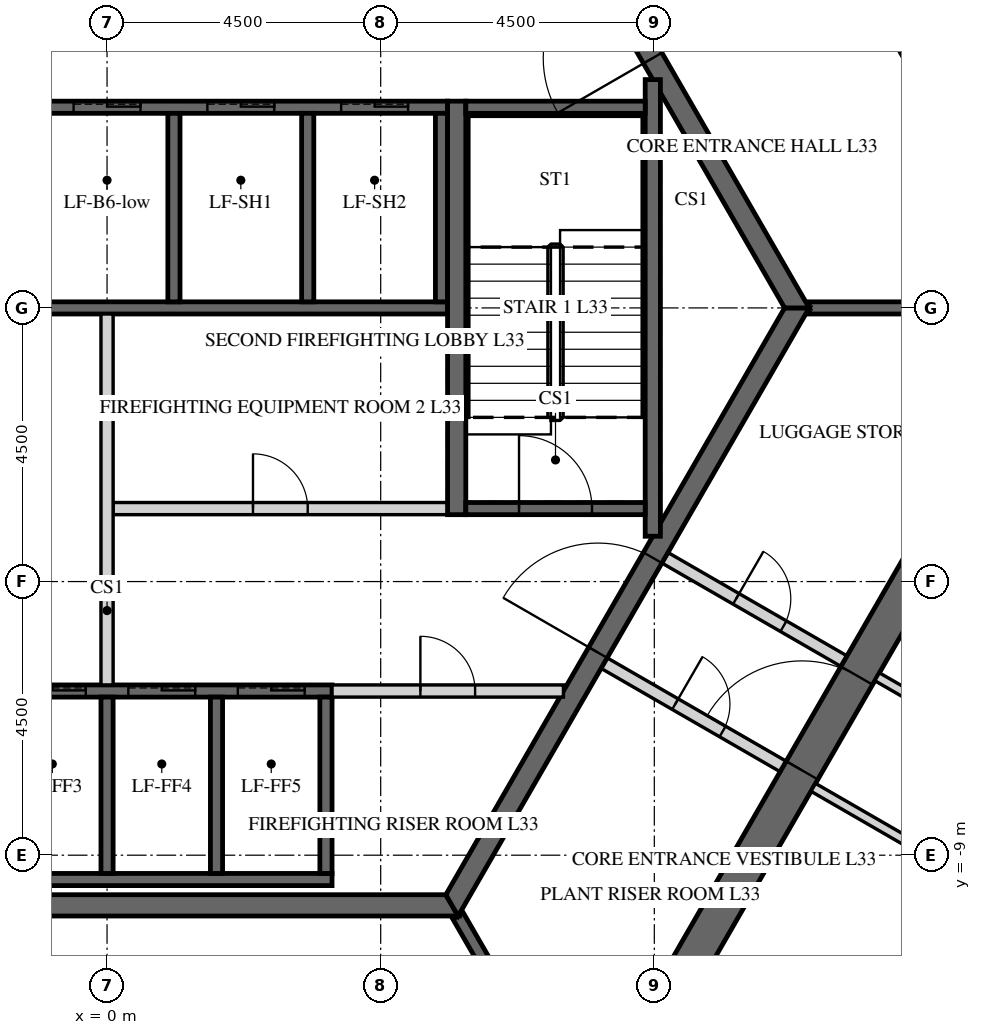
"""IFC4 building model, lengths in metres.
Left out: names, types, materials, properties, quantities, classifications, styles, units other than length and angle.
Written with IfcOpenShell. Run it as: python <this file> out.ifc"""

import sys

from ifc_helpers import new_model, si_unit, direction, frame, frame_2d, origin, place, context, subcontext, project, spatial, polyline, rectangle, outline, extrude, element, fill, save


model = new_model("IFC4")
c1 = context("Model", 3, precision=1e-05, world=origin(), true_north=direction((0.0, 1.0)))
c2 = subcontext(c1, "Body", "Model", "MODEL_VIEW")
j1 = project(units=[si_unit("LENGTHUNIT", "METRE"), si_unit("PLANEANGLEUNIT", "RADIAN")], contexts=[c1])
p1 = place(None, origin())
s1 = spatial("IfcSite", under=j1, at=p1, CompositionType="ELEMENT")
p2 = place(p1, origin())
s2 = spatial("IfcBuilding", under=s1, at=p2, CompositionType="ELEMENT")
p3 = place(p2, frame((0.0, 0.0, 142.8)))
s3 = spatial("IfcBuildingStorey", under=s2, at=p3, CompositionType="ELEMENT", Elevation=142.8)
p4 = place(p3, frame((7.91, -13.7, -0.15), z_axis=(0.0, 0.0, 1.0), x_axis=(0.499999880136, 0.866025472988, 0.0)))
e1 = element("IfcWall", 1, at=p4, inside=s3, PredefinedType="SHEAR", context=c2, shape_type="SweptSolid", body=[
    extrude(outline(polyline([(-0.173, -0.3), (15.993, -0.3), (15.646, 0.3), (0.173, 0.3), (-0.173, -0.3)])), origin(), (0.0, 0.0, 1.0), 3.75),
])
p5 = place(p4, frame((7.039, 0.0, 0.15)))
e2 = element("IfcOpeningElement", 2, at=p5, cuts=e1, PredefinedType="OPENING", context=c2, shape_type="SweptSolid", body=[
    extrude(rectangle(XDim=1.8, YDim=2.4, at=frame_2d((0.9, 1.2))), frame((0.0, 0.31, 0.0), z_axis=(0.0, -1.0, 0.0), x_axis=(1.0, 0.0, 0.0)), (0.0, 0.0, 1.0), 0.62),
])
p6 = place(p3, frame((15.819, 0.0, -0.15), z_axis=(0.0, 0.0, 1.0), x_axis=(-0.499999880136, 0.866025472988, 0.0)))
e3 = element("IfcWall", 3, at=p6, inside=s3, PredefinedType="SHEAR", context=c2, shape_type="SweptSolid", body=[
    extrude(outline(polyline([(-0.173, -0.3), (15.993, -0.3), (15.646, 0.3), (0.173, 0.3), (-0.173, -0.3)])), origin(), (0.0, 0.0, 1.0), 3.75),
])
p7 = place(p6, frame((6.981, 0.0, 0.15)))
e4 = element("IfcOpeningElement", 4, at=p7, cuts=e3, PredefinedType="OPENING", context=c2, shape_type="SweptSolid", body=[
    extrude(rectangle(XDim=1.8, YDim=2.4, at=frame_2d((0.9, 1.2))), frame((0.0, 0.31, 0.0), z_axis=(0.0, -1.0, 0.0), x_axis=(1.0, 0.0, 0.0)), (0.0, 0.0, 1.0), 0.62),
])
p8 = place(p3, frame((-5.673, -9.825, -0.15), z_axis=(0.0, 0.0, 1.0), x_axis=(1.0, 0.0, 0.0)))
e5 = element("IfcWall", 5, at=p8, inside=s3, PredefinedType="SHEAR", context=c2, shape_type="SweptSolid", body=[
    extrude(outline(polyline([(-0.101, -0.175), (11.446, -0.175), (11.244, 0.175), (0.101, 0.175), (-0.101, -0.175)])), origin(), (0.0, 0.0, 1.0), 3.75),
])
p9 = place(p3, frame((5.673, -9.825, -0.15), z_axis=(0.0, 0.0, 1.0), x_axis=(0.499995046907, 0.866028263435, 0.0)))
e6 = element("IfcWall", 6, at=p9, inside=s3, PredefinedType="SHEAR", context=c2, shape_type="SweptSolid", body=[
    extrude(outline(polyline([(-0.101, -0.175), (11.446, -0.175), (11.244, 0.175), (0.101, 0.175), (-0.101, -0.175)])), origin(), (0.0, 0.0, 1.0), 3.75),
])
p10 = place(p9, frame((4.801, 0.0, 0.15)))
e7 = element("IfcOpeningElement", 7, at=p10, cuts=e6, PredefinedType="OPENING", context=c2, shape_type="SweptSolid", body=[
    extrude(rectangle(XDim=1.8, YDim=2.4, at=frame_2d((0.9, 1.2))), frame((0.0, 0.185, 0.0), z_axis=(0.0, -1.0, 0.0), x_axis=(1.0, 0.0, 0.0)), (0.0, 0.0, 1.0), 0.37),
])
p11 = place(p3, frame((11.345, 0.0, -0.15), z_axis=(0.0, 0.0, 1.0), x_axis=(-0.499995046907, 0.866028263435, 0.0)))
e8 = element("IfcWall", 8, at=p11, inside=s3, PredefinedType="SHEAR", context=c2, shape_type="SweptSolid", body=[
    extrude(outline(polyline([(-0.101, -0.175), (11.446, -0.175), (11.244, 0.175), (0.101, 0.175), (-0.101, -0.175)])), origin(), (0.0, 0.0, 1.0), 3.75),
])
p12 = place(p11, frame((4.744, 0.0, 0.15)))
e9 = element("IfcOpeningElement", 9, at=p12, cuts=e8, PredefinedType="OPENING", context=c2, shape_type="SweptSolid", body=[
    extrude(rectangle(XDim=1.8, YDim=2.4, at=frame_2d((0.9, 1.2))), frame((0.0, 0.185, 0.0), z_axis=(0.0, -1.0, 0.0), x_axis=(1.0, 0.0, 0.0)), (0.0, 0.0, 1.0), 0.37),
])
p13 = place(p3, frame((-5.6, 3.3, -0.25), z_axis=(0.0, 0.0, 1.0), x_axis=(1.0, 0.0, 0.0)))
e10 = element("IfcWall", 10, at=p13, inside=s3, PredefinedType="SHEAR", context=c2, shape_type="SweptSolid", body=[
    extrude(rectangle(XDim=11.2, YDim=0.2, at=frame_2d((5.6, 0.0))), origin(), (0.0, 0.0, 1.0), 3.9),
])
p14 = place(p13, frame((0.65, 0.0, 0.25)))
e11 = element("IfcOpeningElement", 11, at=p14, cuts=e10, PredefinedType="OPENING", context=c2, shape_type="SweptSolid", body=[
    extrude(rectangle(XDim=1.1, YDim=2.1, at=frame_2d((0.55, 1.05))), frame((0.0, 0.11, 0.0), z_axis=(0.0, -1.0, 0.0), x_axis=(1.0, 0.0, 0.0)), (0.0, 0.0, 1.0), 0.22),
])
p15 = place(p13, frame((2.85, 0.0, 0.25)))
e12 = element("IfcOpeningElement", 12, at=p15, cuts=e10, PredefinedType="OPENING", context=c2, shape_type="SweptSolid", body=[
    extrude(rectangle(XDim=1.1, YDim=2.1, at=frame_2d((0.55, 1.05))), frame((0.0, 0.11, 0.0), z_axis=(0.0, -1.0, 0.0), x_axis=(1.0, 0.0, 0.0)), (0.0, 0.0, 1.0), 0.22),
])
p16 = place(p13, frame((5.05, 0.0, 0.25)))
e13 = element("IfcOpeningElement", 13, at=p16, cuts=e10, PredefinedType="OPENING", context=c2, shape_type="SweptSolid", body=[
    extrude(rectangle(XDim=1.1, YDim=2.1, at=frame_2d((0.55, 1.05))), frame((0.0, 0.11, 0.0), z_axis=(0.0, -1.0, 0.0), x_axis=(1.0, 0.0, 0.0)), (0.0, 0.0, 1.0), 0.22),
])
p17 = place(p13, frame((7.25, 0.0, 0.25)))
e14 = element("IfcOpeningElement", 14, at=p17, cuts=e10, PredefinedType="OPENING", context=c2, shape_type="SweptSolid", body=[
    extrude(rectangle(XDim=1.1, YDim=2.1, at=frame_2d((0.55, 1.05))), frame((0.0, 0.11, 0.0), z_axis=(0.0, -1.0, 0.0), x_axis=(1.0, 0.0, 0.0)), (0.0, 0.0, 1.0), 0.22),
])
p18 = place(p13, frame((9.45, 0.0, 0.25)))
e15 = element("IfcOpeningElement", 15, at=p18, cuts=e10, PredefinedType="OPENING", context=c2, shape_type="SweptSolid", body=[
    extrude(rectangle(XDim=1.1, YDim=2.1, at=frame_2d((0.55, 1.05))), frame((0.0, 0.11, 0.0), z_axis=(0.0, -1.0, 0.0), x_axis=(1.0, 0.0, 0.0)), (0.0, 0.0, 1.0), 0.22),
])
p19 = place(p3, frame((-5.6, 0.0, -0.25), z_axis=(0.0, 0.0, 1.0), x_axis=(1.0, 0.0, 0.0)))
e16 = element("IfcWall", 16, at=p19, inside=s3, PredefinedType="SHEAR", context=c2, shape_type="SweptSolid", body=[
    extrude(rectangle(XDim=11.2, YDim=0.2, at=frame_2d((5.6, 0.0))), origin(), (0.0, 0.0, 1.0), 3.9),
])
for number, where, z_axis, x_axis in (
    (17, (1.1, 0.1, -0.25), (0.0, 0.0, 1.0), (0.0, 1.0, 0.0)),
    (18, (3.3, 0.1, -0.25), (0.0, 0.0, 1.0), (0.0, 1.0, 0.0)),
    (19, (5.5, 0.1, -0.25), (0.0, 0.0, 1.0), (0.0, 1.0, 0.0)),
):
    element("IfcWall", number, at=place(p3, frame(where, z_axis=z_axis, x_axis=x_axis)), inside=s3, PredefinedType="SHEAR", context=c2, shape_type="SweptSolid", body=[
        extrude(rectangle(XDim=3.1, YDim=0.2, at=frame_2d((1.55, 0.0))), origin(), (0.0, 0.0, 1.0), 3.9),
    ])
p20 = place(p3, frame((-5.5, -6.3, -0.25), z_axis=(0.0, 0.0, 1.0), x_axis=(1.0, 0.0, 0.0)))
e20 = element("IfcWall", 20, at=p20, inside=s3, PredefinedType="SHEAR", context=c2, shape_type="SweptSolid", body=[
    extrude(rectangle(XDim=9.2, YDim=0.2, at=frame_2d((4.6, 0.0))), origin(), (0.0, 0.0, 1.0), 3.9),
])
p21 = place(p20, frame((0.45, 0.0, 0.25)))
e21 = element("IfcOpeningElement", 21, at=p21, cuts=e20, PredefinedType="OPENING", context=c2, shape_type="SweptSolid", body=[
    extrude(rectangle(XDim=1.1, YDim=2.1, at=frame_2d((0.55, 1.05))), frame((0.0, 0.11, 0.0), z_axis=(0.0, -1.0, 0.0), x_axis=(1.0, 0.0, 0.0)), (0.0, 0.0, 1.0), 0.22),
])
p22 = place(p20, frame((2.25, 0.0, 0.25)))
e22 = element("IfcOpeningElement", 22, at=p22, cuts=e20, PredefinedType="OPENING", context=c2, shape_type="SweptSolid", body=[
    extrude(rectangle(XDim=1.1, YDim=2.1, at=frame_2d((0.55, 1.05))), frame((0.0, 0.11, 0.0), z_axis=(0.0, -1.0, 0.0), x_axis=(1.0, 0.0, 0.0)), (0.0, 0.0, 1.0), 0.22),
])
p23 = place(p20, frame((4.05, 0.0, 0.25)))
e23 = element("IfcOpeningElement", 23, at=p23, cuts=e20, PredefinedType="OPENING", context=c2, shape_type="SweptSolid", body=[
    extrude(rectangle(XDim=1.1, YDim=2.1, at=frame_2d((0.55, 1.05))), frame((0.0, 0.11, 0.0), z_axis=(0.0, -1.0, 0.0), x_axis=(1.0, 0.0, 0.0)), (0.0, 0.0, 1.0), 0.22),
])
p24 = place(p20, frame((5.85, 0.0, 0.25)))
e24 = element("IfcOpeningElement", 24, at=p24, cuts=e20, PredefinedType="OPENING", context=c2, shape_type="SweptSolid", body=[
    extrude(rectangle(XDim=1.1, YDim=2.1, at=frame_2d((0.55, 1.05))), frame((0.0, 0.11, 0.0), z_axis=(0.0, -1.0, 0.0), x_axis=(1.0, 0.0, 0.0)), (0.0, 0.0, 1.0), 0.22),
])
p25 = place(p20, frame((7.65, 0.0, 0.25)))
e25 = element("IfcOpeningElement", 25, at=p25, cuts=e20, PredefinedType="OPENING", context=c2, shape_type="SweptSolid", body=[
    extrude(rectangle(XDim=1.1, YDim=2.1, at=frame_2d((0.55, 1.05))), frame((0.0, 0.11, 0.0), z_axis=(0.0, -1.0, 0.0), x_axis=(1.0, 0.0, 0.0)), (0.0, 0.0, 1.0), 0.22),
])
p26 = place(p3, frame((-5.5, -9.4, -0.25), z_axis=(0.0, 0.0, 1.0), x_axis=(1.0, 0.0, 0.0)))
e26 = element("IfcWall", 26, at=p26, inside=s3, PredefinedType="SHEAR", context=c2, shape_type="SweptSolid", body=[
    extrude(rectangle(XDim=9.2, YDim=0.2, at=frame_2d((4.6, 0.0))), origin(), (0.0, 0.0, 1.0), 3.9),
])
for number, where, z_axis, x_axis in (
    (27, (0.0, -9.3, -0.25), (0.0, 0.0, 1.0), (0.0, 1.0, 0.0)),
    (28, (1.8, -9.3, -0.25), (0.0, 0.0, 1.0), (0.0, 1.0, 0.0)),
    (29, (3.6, -9.3, -0.25), (0.0, 0.0, 1.0), (0.0, 1.0, 0.0)),
):
    element("IfcWall", number, at=place(p3, frame(where, z_axis=z_axis, x_axis=x_axis)), inside=s3, PredefinedType="SHEAR", context=c2, shape_type="SweptSolid", body=[
        extrude(rectangle(XDim=2.9, YDim=0.2, at=frame_2d((1.45, 0.0))), origin(), (0.0, 0.0, 1.0), 3.9),
    ])
p27 = place(p3, frame((0.1, -3.3, 0.0), z_axis=(0.0, 0.0, 1.0), x_axis=(1.0, 0.0, 0.0)))
e30 = element("IfcWall", 30, at=p27, inside=s3, PredefinedType="PARTITIONING", context=c2, shape_type="SweptSolid", body=[
    extrude(rectangle(XDim=5.5, YDim=0.2, at=frame_2d((2.75, 0.0))), origin(), (0.0, 0.0, 1.0), 3.65),
])
p28 = place(p27, frame((2.3, 0.0, 0.0)))
e31 = element("IfcOpeningElement", 31, at=p28, cuts=e30, PredefinedType="OPENING", context=c2, shape_type="SweptSolid", body=[
    extrude(rectangle(XDim=0.9, YDim=2.1, at=frame_2d((0.45, 1.05))), frame((0.0, 0.11, 0.0), z_axis=(0.0, -1.0, 0.0), x_axis=(1.0, 0.0, 0.0)), (0.0, 0.0, 1.0), 0.22),
])
p29 = place(p3, frame((0.0, -6.2, 0.0), z_axis=(0.0, 0.0, 1.0), x_axis=(0.0, 1.0, 0.0)))
e32 = element("IfcWall", 32, at=p29, inside=s3, PredefinedType="PARTITIONING", context=c2, shape_type="SweptSolid", body=[
    extrude(rectangle(XDim=6.1, YDim=0.2, at=frame_2d((3.05, 0.0))), origin(), (0.0, 0.0, 1.0), 3.65),
])
p30 = place(p3, frame((3.7, -6.3, 0.0), z_axis=(0.0, 0.0, 1.0), x_axis=(1.0, 0.0, 0.0)))
e33 = element("IfcWall", 33, at=p30, inside=s3, PredefinedType="PARTITIONING", context=c2, shape_type="SweptSolid", body=[
    extrude(rectangle(XDim=3.806, YDim=0.2, at=frame_2d((1.903, 0.0))), origin(), (0.0, 0.0, 1.0), 3.65),
])
p31 = place(p30, frame((1.453, 0.0, 0.0)))
e34 = element("IfcOpeningElement", 34, at=p31, cuts=e33, PredefinedType="OPENING", context=c2, shape_type="SweptSolid", body=[
    extrude(rectangle(XDim=0.9, YDim=2.1, at=frame_2d((0.45, 1.05))), frame((0.0, 0.11, 0.0), z_axis=(0.0, -1.0, 0.0), x_axis=(1.0, 0.0, 0.0)), (0.0, 0.0, 1.0), 0.22),
])
p32 = place(p3, frame((11.547, 0.0, -0.15), z_axis=(0.0, 0.0, 1.0), x_axis=(1.0, 0.0, 0.0)))
e35 = element("IfcWall", 35, at=p32, inside=s3, PredefinedType="SHEAR", context=c2, shape_type="SweptSolid", body=[
    extrude(rectangle(XDim=3.926, YDim=0.2, at=frame_2d((1.963, 0.0))), origin(), (0.0, 0.0, 1.0), 3.75),
])
p33 = place(p3, frame((5.773, -10.0, -0.15), z_axis=(0.0, 0.0, 1.0), x_axis=(0.500038251005, -0.86600331843, 0.0)))
e36 = element("IfcWall", 36, at=p33, inside=s3, PredefinedType="SHEAR", context=c2, shape_type="SweptSolid", body=[
    extrude(rectangle(XDim=3.926, YDim=0.2, at=frame_2d((1.963, 0.0))), origin(), (0.0, 0.0, 1.0), 3.75),
])
p34 = place(p3, frame((9.175, -4.109, 0.0), z_axis=(0.0, 0.0, 1.0), x_axis=(0.865989465428, -0.500062241894, 0.0)))
e37 = element("IfcWall", 37, at=p34, inside=s3, PredefinedType="PARTITIONING", context=c2, shape_type="SweptSolid", body=[
    extrude(rectangle(XDim=3.4, YDim=0.2, at=frame_2d((1.7, 0.0))), origin(), (0.0, 0.0, 1.0), 3.65),
])
p35 = place(p34, frame((1.351, 0.0, 0.0)))
e38 = element("IfcOpeningElement", 38, at=p35, cuts=e37, PredefinedType="OPENING", context=c2, shape_type="SweptSolid", body=[
    extrude(rectangle(XDim=0.9, YDim=2.1, at=frame_2d((0.45, 1.05))), frame((0.0, 0.11, 0.0), z_axis=(0.0, -1.0, 0.0), x_axis=(1.0, 0.0, 0.0)), (0.0, 0.0, 1.0), 0.22),
])
p36 = place(p3, frame((8.175, -5.841, 0.0), z_axis=(0.0, 0.0, 1.0), x_axis=(0.866020560687, -0.500008388397, 0.0)))
e39 = element("IfcWall", 39, at=p36, inside=s3, PredefinedType="PARTITIONING", context=c2, shape_type="SweptSolid", body=[
    extrude(rectangle(XDim=3.4, YDim=0.2, at=frame_2d((1.7, 0.0))), origin(), (0.0, 0.0, 1.0), 3.65),
])
p37 = place(p36, frame((1.35, 0.0, 0.0)))
e40 = element("IfcOpeningElement", 40, at=p37, cuts=e39, PredefinedType="OPENING", context=c2, shape_type="SweptSolid", body=[
    extrude(rectangle(XDim=0.9, YDim=2.1, at=frame_2d((0.45, 1.05))), frame((0.0, 0.11, 0.0), z_axis=(0.0, -1.0, 0.0), x_axis=(1.0, 0.0, 0.0)), (0.0, 0.0, 1.0), 0.22),
])
p38 = place(p3, frame((5.75, -3.4, -0.25), z_axis=(0.0, 0.0, 1.0), x_axis=(0.0, 1.0, 0.0)))
e41 = element("IfcWall", 41, at=p38, inside=s3, PredefinedType="SHEAR", context=c2, shape_type="SweptSolid", body=[
    extrude(rectangle(XDim=6.8, YDim=0.3, at=frame_2d((3.4, 0.0))), origin(), (0.0, 0.0, 1.0), 3.9),
])
p39 = place(p3, frame((8.975, -3.755, -0.25), z_axis=(0.0, 0.0, 1.0), x_axis=(0.0, 1.0, 0.0)))
e42 = element("IfcWall", 42, at=p39, inside=s3, PredefinedType="SHEAR", context=c2, shape_type="SweptSolid", body=[
    extrude(rectangle(XDim=7.51, YDim=0.25, at=frame_2d((3.755, 0.0))), origin(), (0.0, 0.0, 1.0), 3.9),
])
p40 = place(p3, frame((5.9, 3.3, -0.25), z_axis=(0.0, 0.0, 1.0), x_axis=(1.0, 0.0, 0.0)))
e43 = element("IfcWall", 43, at=p40, inside=s3, PredefinedType="SHEAR", context=c2, shape_type="SweptSolid", body=[
    extrude(rectangle(XDim=2.95, YDim=0.2, at=frame_2d((1.475, 0.0))), origin(), (0.0, 0.0, 1.0), 3.9),
])
p41 = place(p3, frame((5.9, -3.3, -0.25), z_axis=(0.0, 0.0, 1.0), x_axis=(1.0, 0.0, 0.0)))
e44 = element("IfcWall", 44, at=p41, inside=s3, PredefinedType="SHEAR", context=c2, shape_type="SweptSolid", body=[
    extrude(rectangle(XDim=2.95, YDim=0.2, at=frame_2d((1.475, 0.0))), origin(), (0.0, 0.0, 1.0), 3.9),
])
p42 = place(p41, frame((0.875, 0.0, 0.25)))
e45 = element("IfcOpeningElement", 45, at=p42, cuts=e44, PredefinedType="OPENING", context=c2, shape_type="SweptSolid", body=[
    extrude(rectangle(XDim=1.2, YDim=2.4, at=frame_2d((0.6, 1.2))), frame((0.0, 0.11, 0.0), z_axis=(0.0, -1.0, 0.0), x_axis=(1.0, 0.0, 0.0)), (0.0, 0.0, 1.0), 0.22),
])
p43 = place(p3, frame((17.665, -8.953, 0.0), z_axis=(0.0, 0.0, 1.0), x_axis=(-0.866025774745, 0.499999357477, 0.0)))
e46 = element("IfcWall", 46, at=p43, inside=s3, PredefinedType="PARTITIONING", context=c2, shape_type="SweptSolid", body=[
    extrude(rectangle(XDim=5.775, YDim=0.15, at=frame_2d((2.887, 0.0))), origin(), (0.0, 0.0, 1.0), 2.838),
])
p44 = place(p3, frame((11.614, -7.884, 0.0), z_axis=(0.0, 0.0, 1.0), x_axis=(0.866018092707, -0.500012662943, 0.0)))
e47 = element("IfcWall", 47, at=p44, inside=s3, PredefinedType="PARTITIONING", context=c2, shape_type="SweptSolid", body=[
    extrude(rectangle(XDim=5.85, YDim=0.15, at=frame_2d((2.925, 0.0))), origin(), (0.0, 0.0, 1.0), 2.838),
])
p45 = place(p5, origin())
e48 = element("IfcDoor", 48, at=p45, inside=s3, OperationType="DOUBLE_DOOR_SINGLE_SWING", PredefinedType="DOOR", context=c2, shape_type="SweptSolid", body=[
    extrude(rectangle(XDim=1.8, YDim=2.4, at=frame_2d((0.9, 1.2))), frame((0.0, 0.025, 0.0), z_axis=(0.0, -1.0, 0.0), x_axis=(1.0, 0.0, 0.0)), (0.0, 0.0, 1.0), 0.05),
])
fill(e2, e48)
p46 = place(p12, origin())
e49 = element("IfcDoor", 49, at=p46, inside=s3, OperationType="DOUBLE_DOOR_SINGLE_SWING", PredefinedType="DOOR", context=c2, shape_type="SweptSolid", body=[
    extrude(rectangle(XDim=1.8, YDim=2.4, at=frame_2d((0.9, 1.2))), frame((0.0, 0.025, 0.0), z_axis=(0.0, -1.0, 0.0), x_axis=(1.0, 0.0, 0.0)), (0.0, 0.0, 1.0), 0.05),
])
fill(e9, e49)
p47 = place(p10, origin())
e50 = element("IfcDoor", 50, at=p47, inside=s3, OperationType="DOUBLE_DOOR_SINGLE_SWING", PredefinedType="DOOR", context=c2, shape_type="SweptSolid", body=[
    extrude(rectangle(XDim=1.8, YDim=2.4, at=frame_2d((0.9, 1.2))), frame((0.0, 0.025, 0.0), z_axis=(0.0, -1.0, 0.0), x_axis=(1.0, 0.0, 0.0)), (0.0, 0.0, 1.0), 0.05),
])
fill(e7, e50)
p48 = place(p28, origin())
e51 = element("IfcDoor", 51, at=p48, inside=s3, OperationType="SINGLE_SWING_LEFT", PredefinedType="DOOR", context=c2, shape_type="SweptSolid", body=[
    extrude(rectangle(XDim=0.9, YDim=2.1, at=frame_2d((0.45, 1.05))), frame((0.0, 0.025, 0.0), z_axis=(0.0, -1.0, 0.0), x_axis=(1.0, 0.0, 0.0)), (0.0, 0.0, 1.0), 0.05),
])
fill(e31, e51)
p49 = place(p31, origin())
e52 = element("IfcDoor", 52, at=p49, inside=s3, OperationType="SINGLE_SWING_LEFT", PredefinedType="DOOR", context=c2, shape_type="SweptSolid", body=[
    extrude(rectangle(XDim=0.9, YDim=2.1, at=frame_2d((0.45, 1.05))), frame((0.0, 0.025, 0.0), z_axis=(0.0, -1.0, 0.0), x_axis=(1.0, 0.0, 0.0)), (0.0, 0.0, 1.0), 0.05),
])
fill(e34, e52)
p50 = place(p35, origin())
e53 = element("IfcDoor", 53, at=p50, inside=s3, OperationType="SINGLE_SWING_LEFT", PredefinedType="DOOR", context=c2, shape_type="SweptSolid", body=[
    extrude(rectangle(XDim=0.9, YDim=2.1, at=frame_2d((0.45, 1.05))), frame((0.0, 0.025, 0.0), z_axis=(0.0, -1.0, 0.0), x_axis=(1.0, 0.0, 0.0)), (0.0, 0.0, 1.0), 0.05),
])
fill(e38, e53)
p51 = place(p37, origin())
e54 = element("IfcDoor", 54, at=p51, inside=s3, OperationType="SINGLE_SWING_LEFT", PredefinedType="DOOR", context=c2, shape_type="SweptSolid", body=[
    extrude(rectangle(XDim=0.9, YDim=2.1, at=frame_2d((0.45, 1.05))), frame((0.0, 0.025, 0.0), z_axis=(0.0, -1.0, 0.0), x_axis=(1.0, 0.0, 0.0)), (0.0, 0.0, 1.0), 0.05),
])
fill(e40, e54)
p52 = place(p42, origin())
e55 = element("IfcDoor", 55, at=p52, inside=s3, OperationType="SINGLE_SWING_LEFT", PredefinedType="DOOR", context=c2, shape_type="SweptSolid", body=[
    extrude(rectangle(XDim=1.2, YDim=2.4, at=frame_2d((0.6, 1.2))), frame((0.0, 0.025, 0.0), z_axis=(0.0, -1.0, 0.0), x_axis=(1.0, 0.0, 0.0)), (0.0, 0.0, 1.0), 0.05),
])
fill(e45, e55)
p53 = place(p16, origin())
e56 = element("IfcDoor", 56, at=p53, inside=s3, OperationType="SLIDING_TO_LEFT", PredefinedType="DOOR", context=c2, shape_type="SweptSolid", body=[
    extrude(rectangle(XDim=1.1, YDim=2.1, at=frame_2d((0.55, 1.05))), frame((0.0, 0.025, 0.0), z_axis=(0.0, -1.0, 0.0), x_axis=(1.0, 0.0, 0.0)), (0.0, 0.0, 1.0), 0.05),
])
fill(e13, e56)
p54 = place(p17, origin())
e57 = element("IfcDoor", 57, at=p54, inside=s3, OperationType="SLIDING_TO_LEFT", PredefinedType="DOOR", context=c2, shape_type="SweptSolid", body=[
    extrude(rectangle(XDim=1.1, YDim=2.1, at=frame_2d((0.55, 1.05))), frame((0.0, 0.025, 0.0), z_axis=(0.0, -1.0, 0.0), x_axis=(1.0, 0.0, 0.0)), (0.0, 0.0, 1.0), 0.05),
])
fill(e14, e57)
p55 = place(p18, origin())
e58 = element("IfcDoor", 58, at=p55, inside=s3, OperationType="SLIDING_TO_LEFT", PredefinedType="DOOR", context=c2, shape_type="SweptSolid", body=[
    extrude(rectangle(XDim=1.1, YDim=2.1, at=frame_2d((0.55, 1.05))), frame((0.0, 0.025, 0.0), z_axis=(0.0, -1.0, 0.0), x_axis=(1.0, 0.0, 0.0)), (0.0, 0.0, 1.0), 0.05),
])
fill(e15, e58)
p56 = place(p23, origin())
e59 = element("IfcDoor", 59, at=p56, inside=s3, OperationType="SLIDING_TO_LEFT", PredefinedType="DOOR", context=c2, shape_type="SweptSolid", body=[
    extrude(rectangle(XDim=1.1, YDim=2.1, at=frame_2d((0.55, 1.05))), frame((0.0, 0.025, 0.0), z_axis=(0.0, -1.0, 0.0), x_axis=(1.0, 0.0, 0.0)), (0.0, 0.0, 1.0), 0.05),
])
fill(e23, e59)
p57 = place(p24, origin())
e60 = element("IfcDoor", 60, at=p57, inside=s3, OperationType="SLIDING_TO_LEFT", PredefinedType="DOOR", context=c2, shape_type="SweptSolid", body=[
    extrude(rectangle(XDim=1.1, YDim=2.1, at=frame_2d((0.55, 1.05))), frame((0.0, 0.025, 0.0), z_axis=(0.0, -1.0, 0.0), x_axis=(1.0, 0.0, 0.0)), (0.0, 0.0, 1.0), 0.05),
])
fill(e24, e60)
p58 = place(p25, origin())
e61 = element("IfcDoor", 61, at=p58, inside=s3, OperationType="SLIDING_TO_LEFT", PredefinedType="DOOR", context=c2, shape_type="SweptSolid", body=[
    extrude(rectangle(XDim=1.1, YDim=2.1, at=frame_2d((0.55, 1.05))), frame((0.0, 0.025, 0.0), z_axis=(0.0, -1.0, 0.0), x_axis=(1.0, 0.0, 0.0)), (0.0, 0.0, 1.0), 0.05),
])
fill(e25, e61)
save(model, sys.argv[1])
